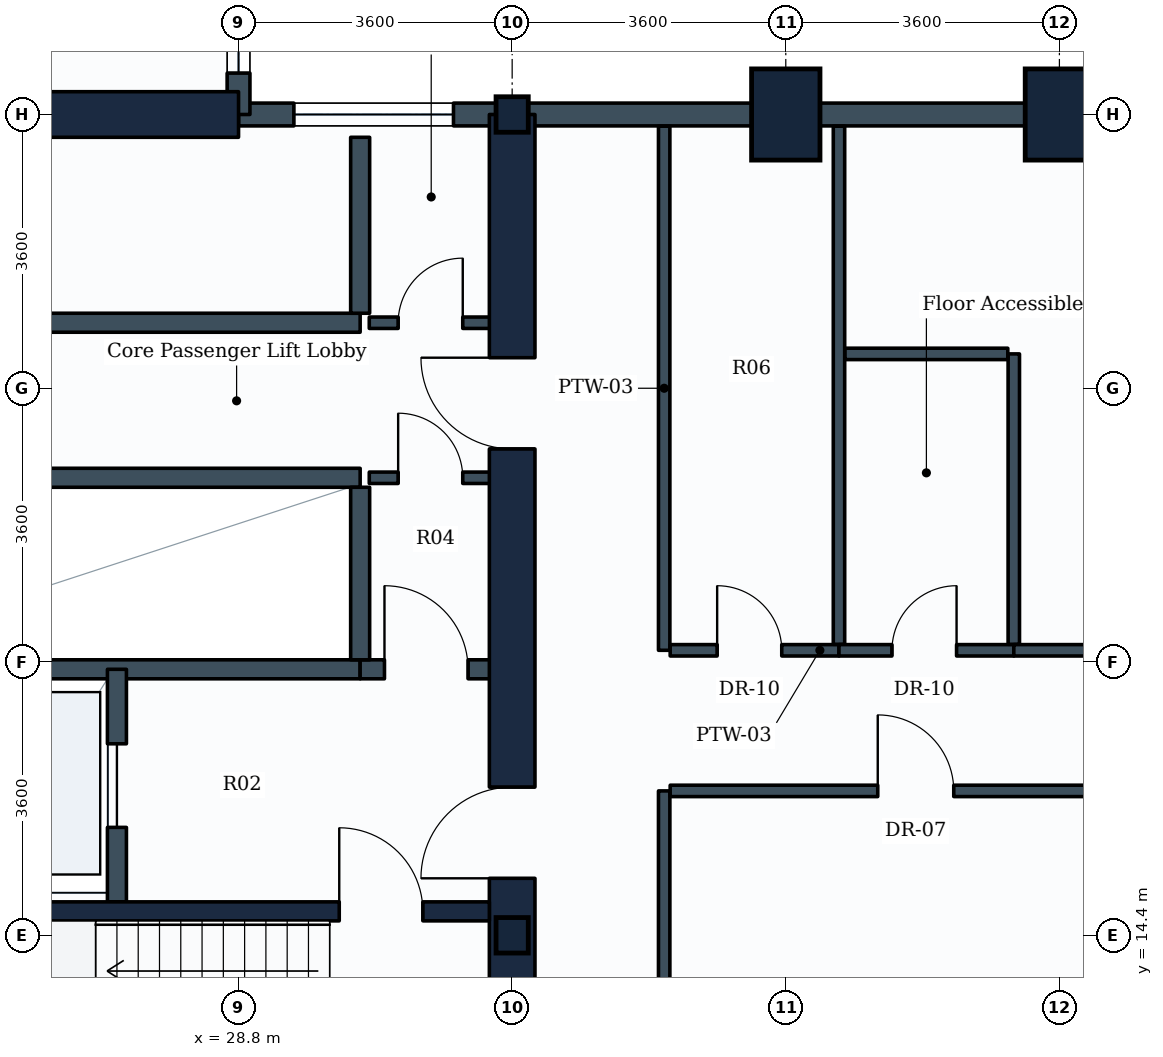
"""IFC4 building model, lengths in metres.
Left out: names, types, materials, properties, quantities, classifications, styles, units other than length and angle.
Written with IfcOpenShell. Run it as: python <this file> out.ifc"""

import sys

from ifc_helpers import new_model, si_unit, direction, frame, frame_2d, origin, origin_2d, place, context, subcontext, project, spatial, rectangle, i_section, extrude, element, fill, save


model = new_model("IFC4")
c1 = context("Model", 3, precision=1e-05, world=origin(), true_north=direction((0.0, 1.0)))
c2 = subcontext(c1, "Body", "Model", "MODEL_VIEW")
j1 = project(units=[si_unit("LENGTHUNIT", "METRE"), si_unit("PLANEANGLEUNIT", "RADIAN")], contexts=[c1])
p1 = place(None, origin())
s1 = spatial("IfcSite", under=j1, at=p1, CompositionType="ELEMENT")
p2 = place(p1, origin())
s2 = spatial("IfcBuilding", under=s1, at=p2, CompositionType="ELEMENT")
p3 = place(p2, frame((0.0, 0.0, 35.7)))
s3 = spatial("IfcBuildingStorey", under=s2, at=p3, CompositionType="ELEMENT", Elevation=35.7)
for number, where, z_axis, x_axis in (
    (1, (32.4, 14.4, 0.0), (0.0, 0.0, 1.0), (1.0, 0.0, 0.0)),
    (2, (32.4, 25.2, 0.0), (0.0, 0.0, 1.0), (1.0, 0.0, 0.0)),
):
    element("IfcColumn", number, at=place(p3, frame(where, z_axis=z_axis, x_axis=x_axis)), inside=s3, PredefinedType="COLUMN", context=c2, shape_type="SweptSolid", body=[
        extrude(i_section(OverallWidth=0.424, OverallDepth=0.467, WebThickness=0.033, FlangeThickness=0.053, FilletRadius=0.015, at=origin_2d()), origin(), (0.0, 0.0, 1.0), 3.9),
    ])
for number, where, z_axis, x_axis in (
    (3, (36.0, 25.2, 0.0), (0.0, 0.0, 1.0), (1.0, 0.0, 0.0)),
    (4, (39.6, 25.2, 0.0), (0.0, 0.0, 1.0), (1.0, 0.0, 0.0)),
):
    element("IfcColumn", number, at=place(p3, frame(where, z_axis=z_axis, x_axis=x_axis)), inside=s3, PredefinedType="COLUMN", context=c2, shape_type="SweptSolid", body=[
        extrude(rectangle(XDim=0.9, YDim=1.2, at=origin_2d()), origin(), (0.0, 0.0, 1.0), 3.9),
    ])
p4 = place(p3, frame((39.6, 25.2, 0.0), z_axis=(0.0, 0.0, 1.0), x_axis=(1.0, 0.0, 0.0)))
e5 = element("IfcWall", 5, at=p4, inside=s3, PredefinedType="STANDARD", context=c2, shape_type="SweptSolid", body=[
    extrude(rectangle(XDim=3.6, YDim=0.3, at=frame_2d((1.8, 0.0))), origin(), (0.0, 0.0, 1.0), 2.93),
])
for number, where, z_axis, x_axis in (
    (6, (36.0, 25.2, 0.0), (0.0, 0.0, 1.0), (1.0, 0.0, 0.0)),
    (7, (32.4, 25.2, 0.0), (0.0, 0.0, 1.0), (1.0, 0.0, 0.0)),
):
    element("IfcWall", number, at=place(p3, frame(where, z_axis=z_axis, x_axis=x_axis)), inside=s3, PredefinedType="STANDARD", context=c2, shape_type="SweptSolid", body=[
        extrude(rectangle(XDim=3.6, YDim=0.3, at=frame_2d((1.8, 0.0))), origin(), (0.0, 0.0, 1.0), 2.93),
    ])
p5 = place(p3, frame((28.8, 25.2, 0.0), z_axis=(0.0, 0.0, 1.0), x_axis=(1.0, 0.0, 0.0)))
e8 = element("IfcWall", 8, at=p5, inside=s3, PredefinedType="STANDARD", context=c2, shape_type="SweptSolid", body=[
    extrude(rectangle(XDim=3.6, YDim=0.3, at=frame_2d((1.8, 0.0))), origin(), (0.0, 0.0, 1.0), 3.635),
])
p6 = place(p5, frame((0.728, 0.0, 0.85)))
e9 = element("IfcOpeningElement", 9, at=p6, cuts=e8, PredefinedType="OPENING", context=c2, shape_type="SweptSolid", body=[
    extrude(rectangle(XDim=2.1, YDim=1.35, at=frame_2d((1.05, 0.675))), frame((0.0, 0.16, 0.0), z_axis=(0.0, -1.0, 0.0), x_axis=(1.0, 0.0, 0.0)), (0.0, 0.0, 1.0), 0.32),
])
p7 = place(p3, frame((28.8, 25.2, 0.0), z_axis=(0.0, 0.0, 1.0), x_axis=(0.0, 1.0, 0.0)))
e10 = element("IfcWall", 10, at=p7, inside=s3, PredefinedType="STANDARD", context=c2, shape_type="SweptSolid", body=[
    extrude(rectangle(XDim=3.6, YDim=0.3, at=frame_2d((1.8, 0.0))), origin(), (0.0, 0.0, 1.0), 3.14),
])
p8 = place(p7, frame((0.545, 0.0, 0.85)))
e11 = element("IfcOpeningElement", 11, at=p8, cuts=e10, PredefinedType="OPENING", context=c2, shape_type="SweptSolid", body=[
    extrude(rectangle(XDim=2.1, YDim=1.35, at=frame_2d((1.05, 0.675))), frame((0.0, 0.16, 0.0), z_axis=(0.0, -1.0, 0.0), x_axis=(1.0, 0.0, 0.0)), (0.0, 0.0, 1.0), 0.32),
])
p9 = place(p3, frame((14.4, 25.2, 0.0), z_axis=(0.0, 0.0, 1.0), x_axis=(1.0, 0.0, 0.0)))
e12 = element("IfcWall", 12, at=p9, inside=s3, PredefinedType="SHEAR", context=c2, shape_type="SweptSolid", body=[
    extrude(rectangle(XDim=14.4, YDim=0.6, at=frame_2d((7.2, 0.0))), origin(), (0.0, 0.0, 1.0), 3.65),
])
p10 = place(p3, frame((32.4, 10.8, 0.0), z_axis=(0.0, 0.0, 1.0), x_axis=(0.0, 1.0, 0.0)))
e13 = element("IfcWall", 13, at=p10, inside=s3, PredefinedType="SHEAR", context=c2, shape_type="SweptSolid", body=[
    extrude(rectangle(XDim=14.4, YDim=0.6, at=frame_2d((7.2, 0.0))), origin(), (0.0, 0.0, 1.0), 3.65),
])
p11 = place(p10, frame((4.35, 0.0, 0.0)))
e14 = element("IfcOpeningElement", 14, at=p11, cuts=e13, PredefinedType="OPENING", context=c2, shape_type="SweptSolid", body=[
    extrude(rectangle(XDim=1.2, YDim=2.1, at=frame_2d((0.6, 1.05))), frame((0.0, 0.31, 0.0), z_axis=(0.0, -1.0, 0.0), x_axis=(1.0, 0.0, 0.0)), (0.0, 0.0, 1.0), 0.62),
])
p12 = place(p10, frame((10.0, 0.0, 0.0)))
e15 = element("IfcOpeningElement", 15, at=p12, cuts=e13, PredefinedType="OPENING", context=c2, shape_type="SweptSolid", body=[
    extrude(rectangle(XDim=1.2, YDim=2.1, at=frame_2d((0.6, 1.05))), frame((0.0, 0.31, 0.0), z_axis=(0.0, -1.0, 0.0), x_axis=(1.0, 0.0, 0.0)), (0.0, 0.0, 1.0), 0.62),
])
p13 = place(p3, frame((23.35, 14.715, 0.0), z_axis=(0.0, 0.0, 1.0), x_axis=(1.0, 0.0, 0.0)))
e16 = element("IfcWall", 16, at=p13, inside=s3, PredefinedType="SHEAR", context=c2, shape_type="SweptSolid", body=[
    extrude(rectangle(XDim=8.75, YDim=0.25, at=frame_2d((4.375, 0.0))), origin(), (0.0, 0.0, 1.0), 3.65),
])
p14 = place(p13, frame((6.775, 0.0, 0.0)))
e17 = element("IfcOpeningElement", 17, at=p14, cuts=e16, PredefinedType="OPENING", context=c2, shape_type="SweptSolid", body=[
    extrude(rectangle(XDim=1.1, YDim=2.1, at=frame_2d((0.55, 1.05))), frame((0.0, 0.135, 0.0), z_axis=(0.0, -1.0, 0.0), x_axis=(1.0, 0.0, 0.0)), (0.0, 0.0, 1.0), 0.27),
])
p15 = place(p3, frame((21.88, 17.9, 0.0), z_axis=(0.0, 0.0, 1.0), x_axis=(1.0, 0.0, 0.0)))
e18 = element("IfcWall", 18, at=p15, inside=s3, PredefinedType="PARTITIONING", context=c2, shape_type="SweptSolid", body=[
    extrude(rectangle(XDim=8.52, YDim=0.25, at=frame_2d((4.26, 0.0))), origin(), (0.0, 0.0, 1.0), 3.635),
])
p16 = place(p3, frame((30.4, 17.9, 0.0), z_axis=(0.0, 0.0, 1.0), x_axis=(1.0, 0.0, 0.0)))
e19 = element("IfcWall", 19, at=p16, inside=s3, PredefinedType="PARTITIONING", context=c2, shape_type="SweptSolid", body=[
    extrude(rectangle(XDim=1.75, YDim=0.25, at=frame_2d((0.875, 0.0))), origin(), (0.0, 0.0, 1.0), 3.635),
])
p17 = place(p16, frame((0.32, 0.0, 0.0)))
e20 = element("IfcOpeningElement", 20, at=p17, cuts=e19, PredefinedType="OPENING", context=c2, shape_type="SweptSolid", body=[
    extrude(rectangle(XDim=1.1, YDim=2.1, at=frame_2d((0.55, 1.05))), frame((0.0, 0.135, 0.0), z_axis=(0.0, -1.0, 0.0), x_axis=(1.0, 0.0, 0.0)), (0.0, 0.0, 1.0), 0.27),
])
p18 = place(p3, frame((27.2, 14.84, 0.0), z_axis=(0.0, 0.0, 1.0), x_axis=(0.0, 1.0, 0.0)))
e21 = element("IfcWall", 21, at=p18, inside=s3, PredefinedType="PARTITIONING", context=c2, shape_type="SweptSolid", body=[
    extrude(rectangle(XDim=3.06, YDim=0.25, at=frame_2d((1.53, 0.0))), origin(), (0.0, 0.0, 1.0), 3.635),
])
p19 = place(p18, frame((0.98, 0.0, 0.0)))
e22 = element("IfcOpeningElement", 22, at=p19, cuts=e21, PredefinedType="OPENING", context=c2, shape_type="SweptSolid", body=[
    extrude(rectangle(XDim=1.1, YDim=2.1, at=frame_2d((0.55, 1.05))), frame((0.0, 0.135, 0.0), z_axis=(0.0, -1.0, 0.0), x_axis=(1.0, 0.0, 0.0)), (0.0, 0.0, 1.0), 0.27),
])
p20 = place(p3, frame((23.18, 20.42, 0.0), z_axis=(0.0, 0.0, 1.0), x_axis=(1.0, 0.0, 0.0)))
e23 = element("IfcWall", 23, at=p20, inside=s3, PredefinedType="PARTITIONING", context=c2, shape_type="SweptSolid", body=[
    extrude(rectangle(XDim=7.22, YDim=0.25, at=frame_2d((3.61, 0.0))), origin(), (0.0, 0.0, 1.0), 3.635),
])
p21 = place(p3, frame((30.4, 18.025, 0.0), z_axis=(0.0, 0.0, 1.0), x_axis=(0.0, 1.0, 0.0)))
e24 = element("IfcWall", 24, at=p21, inside=s3, PredefinedType="PARTITIONING", context=c2, shape_type="SweptSolid", body=[
    extrude(rectangle(XDim=2.27, YDim=0.25, at=frame_2d((1.135, 0.0))), origin(), (0.0, 0.0, 1.0), 3.635),
])
p22 = place(p3, frame((23.18, 22.46, 0.0), z_axis=(0.0, 0.0, 1.0), x_axis=(1.0, 0.0, 0.0)))
e25 = element("IfcWall", 25, at=p22, inside=s3, PredefinedType="PARTITIONING", context=c2, shape_type="SweptSolid", body=[
    extrude(rectangle(XDim=7.22, YDim=0.25, at=frame_2d((3.61, 0.0))), origin(), (0.0, 0.0, 1.0), 3.635),
])
p23 = place(p3, frame((30.4, 22.585, 0.0), z_axis=(0.0, 0.0, 1.0), x_axis=(0.0, 1.0, 0.0)))
e26 = element("IfcWall", 26, at=p23, inside=s3, PredefinedType="PARTITIONING", context=c2, shape_type="SweptSolid", body=[
    extrude(rectangle(XDim=2.315, YDim=0.25, at=frame_2d((1.157, 0.0))), origin(), (0.0, 0.0, 1.0), 3.635),
])
p24 = place(p3, frame((30.52, 22.46, 0.0), z_axis=(0.0, 0.0, 1.0), x_axis=(1.0, 0.0, 0.0)))
e27 = element("IfcWall", 27, at=p24, inside=s3, PredefinedType="PARTITIONING", context=c2, shape_type="SweptSolid", body=[
    extrude(rectangle(XDim=1.63, YDim=0.15, at=frame_2d((0.815, 0.0))), origin(), (0.0, 0.0, 1.0), 3.635),
])
p25 = place(p24, frame((0.38, 0.0, 0.0)))
e28 = element("IfcOpeningElement", 28, at=p25, cuts=e27, PredefinedType="OPENING", context=c2, shape_type="SweptSolid", body=[
    extrude(rectangle(XDim=0.85, YDim=2.1, at=frame_2d((0.425, 1.05))), frame((0.0, 0.085, 0.0), z_axis=(0.0, -1.0, 0.0), x_axis=(1.0, 0.0, 0.0)), (0.0, 0.0, 1.0), 0.17),
])
p26 = place(p3, frame((30.52, 20.42, 0.0), z_axis=(0.0, 0.0, 1.0), x_axis=(1.0, 0.0, 0.0)))
e29 = element("IfcWall", 29, at=p26, inside=s3, PredefinedType="PARTITIONING", context=c2, shape_type="SweptSolid", body=[
    extrude(rectangle(XDim=1.63, YDim=0.15, at=frame_2d((0.815, 0.0))), origin(), (0.0, 0.0, 1.0), 3.635),
])
p27 = place(p26, frame((0.38, 0.0, 0.0)))
e30 = element("IfcOpeningElement", 30, at=p27, cuts=e29, PredefinedType="OPENING", context=c2, shape_type="SweptSolid", body=[
    extrude(rectangle(XDim=0.85, YDim=2.1, at=frame_2d((0.425, 1.05))), frame((0.0, 0.085, 0.0), z_axis=(0.0, -1.0, 0.0), x_axis=(1.0, 0.0, 0.0)), (0.0, 0.0, 1.0), 0.17),
])
p28 = place(p3, frame((34.4, 18.15, 0.0), z_axis=(0.0, 0.0, 1.0), x_axis=(0.0, 1.0, 0.0)))
e31 = element("IfcWall", 31, at=p28, inside=s3, PredefinedType="PARTITIONING", context=c2, shape_type="SweptSolid", body=[
    extrude(rectangle(XDim=6.896, YDim=0.15, at=frame_2d((3.448, 0.0))), origin(), (0.0, 0.0, 1.0), 2.93),
])
p29 = place(p3, frame((34.479, 18.15, 0.0), z_axis=(0.0, 0.0, 1.0), x_axis=(1.0, 0.0, 0.0)))
e32 = element("IfcWall", 32, at=p29, inside=s3, PredefinedType="PARTITIONING", context=c2, shape_type="SweptSolid", body=[
    extrude(rectangle(XDim=2.221, YDim=0.15, at=frame_2d((1.11, 0.0))), origin(), (0.0, 0.0, 1.0), 3.08),
])
p30 = place(p29, frame((0.618, 0.0, 0.0)))
e33 = element("IfcOpeningElement", 33, at=p30, cuts=e32, PredefinedType="OPENING", context=c2, shape_type="SweptSolid", body=[
    extrude(rectangle(XDim=0.85, YDim=2.1, at=frame_2d((0.425, 1.05))), frame((0.0, 0.085, 0.0), z_axis=(0.0, -1.0, 0.0), x_axis=(1.0, 0.0, 0.0)), (0.0, 0.0, 1.0), 0.17),
])
p31 = place(p3, frame((36.7, 18.229, 0.0), z_axis=(0.0, 0.0, 1.0), x_axis=(0.0, 1.0, 0.0)))
e34 = element("IfcWall", 34, at=p31, inside=s3, PredefinedType="PARTITIONING", context=c2, shape_type="SweptSolid", body=[
    extrude(rectangle(XDim=6.817, YDim=0.15, at=frame_2d((3.408, 0.0))), origin(), (0.0, 0.0, 1.0), 2.93),
])
p32 = place(p3, frame((36.7, 18.15, 0.0), z_axis=(0.0, 0.0, 1.0), x_axis=(1.0, 0.0, 0.0)))
e35 = element("IfcWall", 35, at=p32, inside=s3, PredefinedType="PARTITIONING", context=c2, shape_type="SweptSolid", body=[
    extrude(rectangle(XDim=2.3, YDim=0.15, at=frame_2d((1.15, 0.0))), origin(), (0.0, 0.0, 1.0), 3.08),
])
p33 = place(p32, frame((0.697, 0.0, 0.0)))
e36 = element("IfcOpeningElement", 36, at=p33, cuts=e35, PredefinedType="OPENING", context=c2, shape_type="SweptSolid", body=[
    extrude(rectangle(XDim=0.85, YDim=2.1, at=frame_2d((0.425, 1.05))), frame((0.0, 0.085, 0.0), z_axis=(0.0, -1.0, 0.0), x_axis=(1.0, 0.0, 0.0)), (0.0, 0.0, 1.0), 0.17),
])
p34 = place(p3, frame((39.0, 18.229, 0.0), z_axis=(0.0, 0.0, 1.0), x_axis=(0.0, 1.0, 0.0)))
e37 = element("IfcWall", 37, at=p34, inside=s3, PredefinedType="PARTITIONING", context=c2, shape_type="SweptSolid", body=[
    extrude(rectangle(XDim=3.821, YDim=0.15, at=frame_2d((1.911, 0.0))), origin(), (0.0, 0.0, 1.0), 3.03),
])
p35 = place(p3, frame((36.779, 22.05, 0.0), z_axis=(0.0, 0.0, 1.0), x_axis=(1.0, 0.0, 0.0)))
e38 = element("IfcWall", 38, at=p35, inside=s3, PredefinedType="PARTITIONING", context=c2, shape_type="SweptSolid", body=[
    extrude(rectangle(XDim=2.142, YDim=0.15, at=frame_2d((1.071, 0.0))), origin(), (0.0, 0.0, 1.0), 3.635),
])
p36 = place(p3, frame((34.4, 3.754, 0.0), z_axis=(0.0, 0.0, 1.0), x_axis=(0.0, 1.0, 0.0)))
e39 = element("IfcWall", 39, at=p36, inside=s3, PredefinedType="PARTITIONING", context=c2, shape_type="SweptSolid", body=[
    extrude(rectangle(XDim=12.546, YDim=0.15, at=frame_2d((6.273, 0.0))), origin(), (0.0, 0.0, 1.0), 2.93),
])
p37 = place(p3, frame((34.479, 16.3, 0.0), z_axis=(0.0, 0.0, 1.0), x_axis=(1.0, 0.0, 0.0)))
e40 = element("IfcWall", 40, at=p37, inside=s3, PredefinedType="PARTITIONING", context=c2, shape_type="SweptSolid", body=[
    extrude(rectangle(XDim=6.542, YDim=0.15, at=frame_2d((3.271, 0.0))), origin(), (0.0, 0.0, 1.0), 3.04),
])
p38 = place(p37, frame((2.731, 0.0, 0.0)))
e41 = element("IfcOpeningElement", 41, at=p38, cuts=e40, PredefinedType="OPENING", context=c2, shape_type="SweptSolid", body=[
    extrude(rectangle(XDim=1.0, YDim=2.1, at=frame_2d((0.5, 1.05))), frame((0.0, 0.085, 0.0), z_axis=(0.0, -1.0, 0.0), x_axis=(1.0, 0.0, 0.0)), (0.0, 0.0, 1.0), 0.17),
])
p39 = place(p3, frame((39.0, 18.15, 0.0), z_axis=(0.0, 0.0, 1.0), x_axis=(1.0, 0.0, 0.0)))
e42 = element("IfcWall", 42, at=p39, inside=s3, PredefinedType="PARTITIONING", context=c2, shape_type="SweptSolid", body=[
    extrude(rectangle(XDim=7.911, YDim=0.15, at=frame_2d((3.956, 0.0))), origin(), (0.0, 0.0, 1.0), 3.03),
])
p40 = place(p39, frame((3.455, 0.0, 0.0)))
e43 = element("IfcOpeningElement", 43, at=p40, cuts=e42, PredefinedType="OPENING", context=c2, shape_type="SweptSolid", body=[
    extrude(rectangle(XDim=1.0, YDim=2.1, at=frame_2d((0.5, 1.05))), frame((0.0, 0.085, 0.0), z_axis=(0.0, -1.0, 0.0), x_axis=(1.0, 0.0, 0.0)), (0.0, 0.0, 1.0), 0.17),
])
p41 = place(p6, origin())
e44 = element("IfcWindow", 44, at=p41, inside=s3, PartitioningType="SINGLE_PANEL", PredefinedType="WINDOW", context=c2, shape_type="SweptSolid", body=[
    extrude(rectangle(XDim=2.1, YDim=1.35, at=frame_2d((1.05, 0.675))), frame((0.0, 0.03, 0.0), z_axis=(0.0, -1.0, 0.0), x_axis=(1.0, 0.0, 0.0)), (0.0, 0.0, 1.0), 0.06),
])
fill(e9, e44)
p42 = place(p8, origin())
e45 = element("IfcWindow", 45, at=p42, inside=s3, PartitioningType="SINGLE_PANEL", PredefinedType="WINDOW", context=c2, shape_type="SweptSolid", body=[
    extrude(rectangle(XDim=2.1, YDim=1.35, at=frame_2d((1.05, 0.675))), frame((0.0, 0.03, 0.0), z_axis=(0.0, -1.0, 0.0), x_axis=(1.0, 0.0, 0.0)), (0.0, 0.0, 1.0), 0.06),
])
fill(e11, e45)
p43 = place(p14, origin())
e46 = element("IfcDoor", 46, at=p43, inside=s3, OperationType="SINGLE_SWING_LEFT", PredefinedType="DOOR", context=c2, shape_type="SweptSolid", body=[
    extrude(rectangle(XDim=1.1, YDim=2.1, at=frame_2d((0.55, 1.05))), frame((0.0, 0.025, 0.0), z_axis=(0.0, -1.0, 0.0), x_axis=(1.0, 0.0, 0.0)), (0.0, 0.0, 1.0), 0.05),
])
fill(e17, e46)
p44 = place(p19, origin())
e47 = element("IfcDoor", 47, at=p44, inside=s3, OperationType="SLIDING_TO_LEFT", PredefinedType="DOOR", context=c2, shape_type="SweptSolid", body=[
    extrude(rectangle(XDim=1.1, YDim=2.1, at=frame_2d((0.55, 1.05))), frame((0.0, 0.025, 0.0), z_axis=(0.0, -1.0, 0.0), x_axis=(1.0, 0.0, 0.0)), (0.0, 0.0, 1.0), 0.05),
])
fill(e22, e47)
p45 = place(p11, origin())
e48 = element("IfcDoor", 48, at=p45, inside=s3, OperationType="SINGLE_SWING_LEFT", PredefinedType="DOOR", context=c2, shape_type="SweptSolid", body=[
    extrude(rectangle(XDim=1.2, YDim=2.1, at=frame_2d((0.6, 1.05))), frame((0.0, 0.025, 0.0), z_axis=(0.0, -1.0, 0.0), x_axis=(1.0, 0.0, 0.0)), (0.0, 0.0, 1.0), 0.05),
])
fill(e14, e48)
p46 = place(p17, origin())
e49 = element("IfcDoor", 49, at=p46, inside=s3, OperationType="SINGLE_SWING_LEFT", PredefinedType="DOOR", context=c2, shape_type="SweptSolid", body=[
    extrude(rectangle(XDim=1.1, YDim=2.1, at=frame_2d((0.55, 1.05))), frame((0.0, 0.025, 0.0), z_axis=(0.0, -1.0, 0.0), x_axis=(1.0, 0.0, 0.0)), (0.0, 0.0, 1.0), 0.05),
])
fill(e20, e49)
p47 = place(p12, origin())
e50 = element("IfcDoor", 50, at=p47, inside=s3, OperationType="SINGLE_SWING_RIGHT", PredefinedType="DOOR", context=c2, shape_type="SweptSolid", body=[
    extrude(rectangle(XDim=1.2, YDim=2.1, at=frame_2d((0.6, 1.05))), frame((0.0, 0.025, 0.0), z_axis=(0.0, -1.0, 0.0), x_axis=(1.0, 0.0, 0.0)), (0.0, 0.0, 1.0), 0.05),
])
fill(e15, e50)
p48 = place(p25, origin())
e51 = element("IfcDoor", 51, at=p48, inside=s3, OperationType="SINGLE_SWING_RIGHT", PredefinedType="DOOR", context=c2, shape_type="SweptSolid", body=[
    extrude(rectangle(XDim=0.85, YDim=2.1, at=frame_2d((0.425, 1.05))), frame((0.0, 0.025, 0.0), z_axis=(0.0, -1.0, 0.0), x_axis=(1.0, 0.0, 0.0)), (0.0, 0.0, 1.0), 0.05),
])
fill(e28, e51)
p49 = place(p27, origin())
e52 = element("IfcDoor", 52, at=p49, inside=s3, OperationType="SINGLE_SWING_LEFT", PredefinedType="DOOR", context=c2, shape_type="SweptSolid", body=[
    extrude(rectangle(XDim=0.85, YDim=2.1, at=frame_2d((0.425, 1.05))), frame((0.0, 0.025, 0.0), z_axis=(0.0, -1.0, 0.0), x_axis=(1.0, 0.0, 0.0)), (0.0, 0.0, 1.0), 0.05),
])
fill(e30, e52)
p50 = place(p30, origin())
e53 = element("IfcDoor", 53, at=p50, inside=s3, OperationType="SINGLE_SWING_LEFT", PredefinedType="DOOR", context=c2, shape_type="SweptSolid", body=[
    extrude(rectangle(XDim=0.85, YDim=2.1, at=frame_2d((0.425, 1.05))), frame((0.0, 0.025, 0.0), z_axis=(0.0, -1.0, 0.0), x_axis=(1.0, 0.0, 0.0)), (0.0, 0.0, 1.0), 0.05),
])
fill(e33, e53)
p51 = place(p33, origin())
e54 = element("IfcDoor", 54, at=p51, inside=s3, OperationType="SINGLE_SWING_RIGHT", PredefinedType="DOOR", context=c2, shape_type="SweptSolid", body=[
    extrude(rectangle(XDim=0.85, YDim=2.1, at=frame_2d((0.425, 1.05))), frame((0.0, 0.025, 0.0), z_axis=(0.0, -1.0, 0.0), x_axis=(1.0, 0.0, 0.0)), (0.0, 0.0, 1.0), 0.05),
])
fill(e36, e54)
p52 = place(p38, origin())
e55 = element("IfcDoor", 55, at=p52, inside=s3, OperationType="SINGLE_SWING_LEFT", PredefinedType="DOOR", context=c2, shape_type="SweptSolid", body=[
    extrude(rectangle(XDim=1.0, YDim=2.1, at=frame_2d((0.5, 1.05))), frame((0.0, 0.025, 0.0), z_axis=(0.0, -1.0, 0.0), x_axis=(1.0, 0.0, 0.0)), (0.0, 0.0, 1.0), 0.05),
])
fill(e41, e55)
save(model, sys.argv[1])
